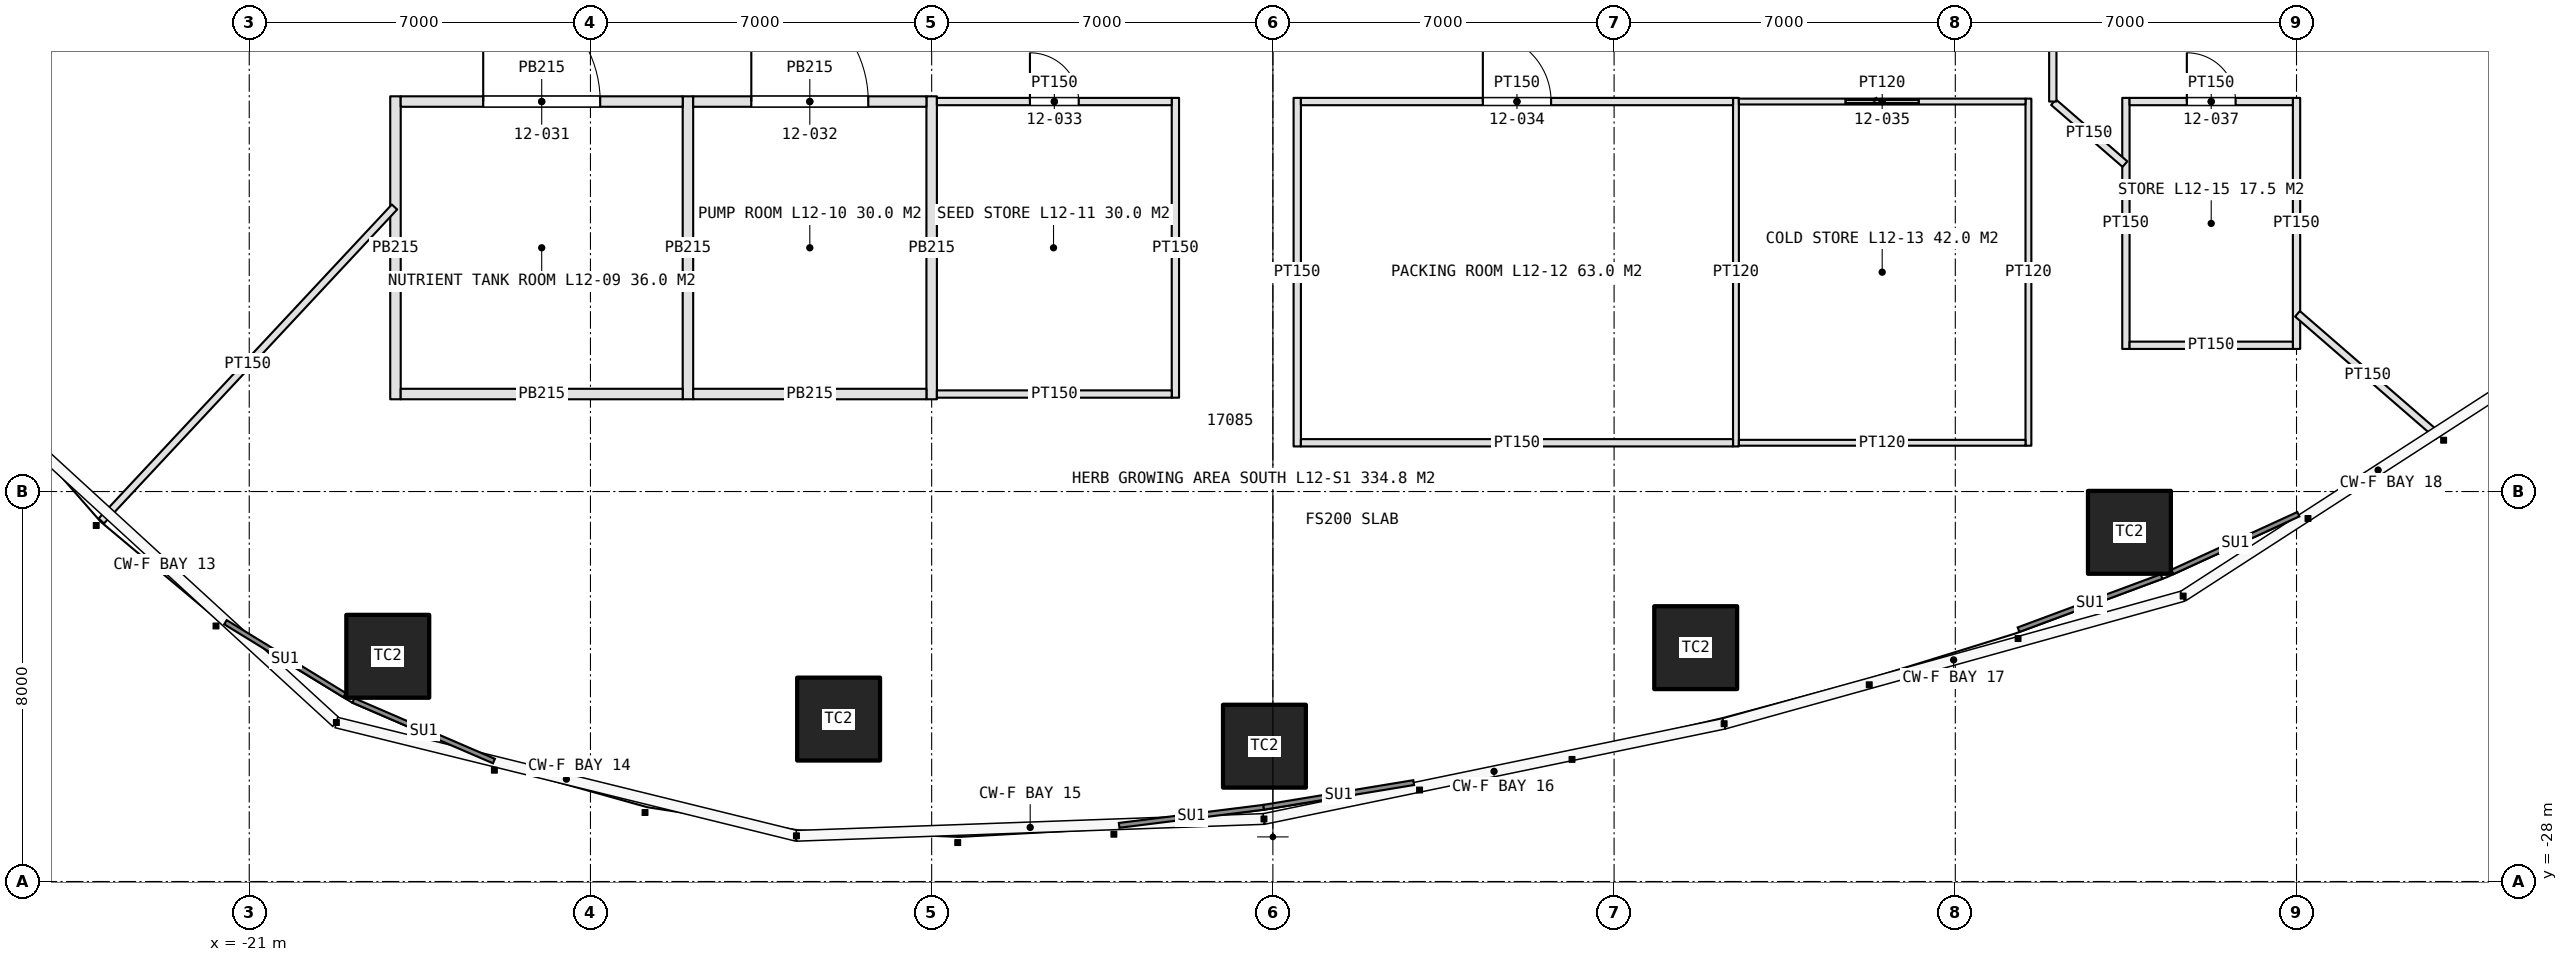
"""IFC4 building model, lengths in metres.
Left out: names, types, materials, properties, quantities, classifications, styles, units other than length and angle.
Written with IfcOpenShell. Run it as: python <this file> out.ifc"""

import sys

from ifc_helpers import new_model, si_unit, direction, frame, frame_2d, origin, origin_2d, place, context, subcontext, project, spatial, rectangle, extrude, element, fill, save


model = new_model("IFC4")
c1 = context("Model", 3, precision=1e-05, world=origin(), true_north=direction((0.0, 1.0)))
c2 = subcontext(c1, "Body", "Model", "MODEL_VIEW")
j1 = project(units=[si_unit("LENGTHUNIT", "METRE"), si_unit("PLANEANGLEUNIT", "RADIAN")], contexts=[c1])
p1 = place(None, origin())
s1 = spatial("IfcSite", under=j1, at=p1, CompositionType="ELEMENT")
p2 = place(p1, origin())
s2 = spatial("IfcBuilding", under=s1, at=p2, CompositionType="ELEMENT")
p3 = place(p2, frame((0.0, 0.0, 60.0)))
s3 = spatial("IfcBuildingStorey", under=s2, at=p3, CompositionType="ELEMENT", Elevation=60.0)
for number, where, z_axis, x_axis in (
    (1, (-18.158, -23.38, 0.0), (0.0, 0.0, 1.0), (1.0, 0.0, 0.0)),
    (2, (-8.909, -24.668, 0.0), (0.0, 0.0, 1.0), (1.0, 0.0, 0.0)),
    (3, (-0.173, -25.224, 0.0), (0.0, 0.0, 1.0), (1.0, 0.0, 0.0)),
    (4, (8.674, -23.203, 0.0), (0.0, 0.0, 1.0), (1.0, 0.0, 0.0)),
    (5, (17.572, -20.837, 0.0), (0.0, 0.0, 1.0), (1.0, 0.0, 0.0)),
):
    element("IfcColumn", number, at=place(p3, frame(where, z_axis=z_axis, x_axis=x_axis)), inside=s3, PredefinedType="COLUMN", context=c2, shape_type="SweptSolid", body=[
        extrude(rectangle(XDim=1.7, YDim=1.7, at=origin_2d()), origin(), (0.0, 0.0, 1.0), 5.0),
    ])
for number, where, z_axis, x_axis in (
    (6, (-18.0, -11.893, 0.0), (0.0, 0.0, 1.0), (0.0, -1.0, 0.0)),
    (7, (-12.0, -11.893, 0.0), (0.0, 0.0, 1.0), (0.0, -1.0, 0.0)),
    (8, (-7.0, -11.893, 0.0), (0.0, 0.0, 1.0), (0.0, -1.0, 0.0)),
):
    element("IfcWall", number, at=place(p3, frame(where, z_axis=z_axis, x_axis=x_axis)), inside=s3, PredefinedType="PARTITIONING", context=c2, shape_type="SweptSolid", body=[
        extrude(rectangle(XDim=6.215, YDim=0.215, at=frame_2d((3.107, 0.0))), origin(), (0.0, 0.0, 1.0), 3.6),
    ])
p4 = place(p3, frame((-2.0, -11.925, 0.0), z_axis=(0.0, 0.0, 1.0), x_axis=(0.0, -1.0, 0.0)))
e9 = element("IfcWall", 9, at=p4, inside=s3, PredefinedType="PARTITIONING", context=c2, shape_type="SweptSolid", body=[
    extrude(rectangle(XDim=6.15, YDim=0.15, at=frame_2d((3.075, 0.0))), origin(), (0.0, 0.0, 1.0), 3.6),
])
p5 = place(p3, frame((-17.893, -12.0, 0.0), z_axis=(0.0, 0.0, 1.0), x_axis=(1.0, 0.0, 0.0)))
e10 = element("IfcWall", 10, at=p5, inside=s3, PredefinedType="PARTITIONING", context=c2, shape_type="SweptSolid", body=[
    extrude(rectangle(XDim=5.785, YDim=0.215, at=frame_2d((2.893, 0.0))), origin(), (0.0, 0.0, 1.0), 3.6),
])
p6 = place(p5, frame((1.692, 0.0, 0.0)))
e11 = element("IfcOpeningElement", 11, at=p6, cuts=e10, PredefinedType="OPENING", context=c2, shape_type="SweptSolid", body=[
    extrude(rectangle(XDim=2.4, YDim=2.4, at=frame_2d((1.2, 1.2))), frame((0.0, 0.118, 0.0), z_axis=(0.0, -1.0, 0.0), x_axis=(1.0, 0.0, 0.0)), (0.0, 0.0, 1.0), 0.235),
])
p7 = place(p3, frame((-17.893, -18.0, 0.0), z_axis=(0.0, 0.0, 1.0), x_axis=(1.0, 0.0, 0.0)))
e12 = element("IfcWall", 12, at=p7, inside=s3, PredefinedType="PARTITIONING", context=c2, shape_type="SweptSolid", body=[
    extrude(rectangle(XDim=5.785, YDim=0.215, at=frame_2d((2.893, 0.0))), origin(), (0.0, 0.0, 1.0), 3.6),
])
p8 = place(p3, frame((-11.893, -12.0, 0.0), z_axis=(0.0, 0.0, 1.0), x_axis=(1.0, 0.0, 0.0)))
e13 = element("IfcWall", 13, at=p8, inside=s3, PredefinedType="PARTITIONING", context=c2, shape_type="SweptSolid", body=[
    extrude(rectangle(XDim=4.785, YDim=0.215, at=frame_2d((2.393, 0.0))), origin(), (0.0, 0.0, 1.0), 3.6),
])
p9 = place(p8, frame((1.192, 0.0, 0.0)))
e14 = element("IfcOpeningElement", 14, at=p9, cuts=e13, PredefinedType="OPENING", context=c2, shape_type="SweptSolid", body=[
    extrude(rectangle(XDim=2.4, YDim=2.4, at=frame_2d((1.2, 1.2))), frame((0.0, 0.118, 0.0), z_axis=(0.0, -1.0, 0.0), x_axis=(1.0, 0.0, 0.0)), (0.0, 0.0, 1.0), 0.235),
])
p10 = place(p3, frame((-11.893, -18.0, 0.0), z_axis=(0.0, 0.0, 1.0), x_axis=(1.0, 0.0, 0.0)))
e15 = element("IfcWall", 15, at=p10, inside=s3, PredefinedType="PARTITIONING", context=c2, shape_type="SweptSolid", body=[
    extrude(rectangle(XDim=4.785, YDim=0.215, at=frame_2d((2.393, 0.0))), origin(), (0.0, 0.0, 1.0), 3.6),
])
p11 = place(p3, frame((-6.893, -12.0, 0.0), z_axis=(0.0, 0.0, 1.0), x_axis=(1.0, 0.0, 0.0)))
e16 = element("IfcWall", 16, at=p11, inside=s3, PredefinedType="PARTITIONING", context=c2, shape_type="SweptSolid", body=[
    extrude(rectangle(XDim=4.818, YDim=0.15, at=frame_2d((2.409, 0.0))), origin(), (0.0, 0.0, 1.0), 3.6),
])
p12 = place(p11, frame((1.909, 0.0, 0.0)))
e17 = element("IfcOpeningElement", 17, at=p12, cuts=e16, PredefinedType="OPENING", context=c2, shape_type="SweptSolid", body=[
    extrude(rectangle(XDim=1.0, YDim=2.2, at=frame_2d((0.5, 1.1))), frame((0.0, 0.085, 0.0), z_axis=(0.0, -1.0, 0.0), x_axis=(1.0, 0.0, 0.0)), (0.0, 0.0, 1.0), 0.17),
])
p13 = place(p3, frame((-6.893, -18.0, 0.0), z_axis=(0.0, 0.0, 1.0), x_axis=(1.0, 0.0, 0.0)))
e18 = element("IfcWall", 18, at=p13, inside=s3, PredefinedType="PARTITIONING", context=c2, shape_type="SweptSolid", body=[
    extrude(rectangle(XDim=4.818, YDim=0.15, at=frame_2d((2.409, 0.0))), origin(), (0.0, 0.0, 1.0), 3.6),
])
p14 = place(p3, frame((0.5, -11.925, 0.0), z_axis=(0.0, 0.0, 1.0), x_axis=(0.0, -1.0, 0.0)))
e19 = element("IfcWall", 19, at=p14, inside=s3, PredefinedType="PARTITIONING", context=c2, shape_type="SweptSolid", body=[
    extrude(rectangle(XDim=7.15, YDim=0.15, at=frame_2d((3.575, 0.0))), origin(), (0.0, 0.0, 1.0), 3.6),
])
p15 = place(p3, frame((9.5, -11.925, 0.0), z_axis=(0.0, 0.0, 1.0), x_axis=(0.0, -1.0, 0.0)))
e20 = element("IfcWall", 20, at=p15, inside=s3, PredefinedType="PARTITIONING", context=c2, shape_type="SweptSolid", body=[
    extrude(rectangle(XDim=7.15, YDim=0.12, at=frame_2d((3.575, 0.0))), origin(), (0.0, 0.0, 1.0), 3.6),
])
p16 = place(p3, frame((15.5, -11.94, 0.0), z_axis=(0.0, 0.0, 1.0), x_axis=(0.0, -1.0, 0.0)))
e21 = element("IfcWall", 21, at=p16, inside=s3, PredefinedType="PARTITIONING", context=c2, shape_type="SweptSolid", body=[
    extrude(rectangle(XDim=7.12, YDim=0.12, at=frame_2d((3.56, 0.0))), origin(), (0.0, 0.0, 1.0), 3.6),
])
p17 = place(p3, frame((0.575, -12.0, 0.0), z_axis=(0.0, 0.0, 1.0), x_axis=(1.0, 0.0, 0.0)))
e22 = element("IfcWall", 22, at=p17, inside=s3, PredefinedType="PARTITIONING", context=c2, shape_type="SweptSolid", body=[
    extrude(rectangle(XDim=8.865, YDim=0.15, at=frame_2d((4.433, 0.0))), origin(), (0.0, 0.0, 1.0), 3.6),
])
p18 = place(p17, frame((3.732, 0.0, 0.0)))
e23 = element("IfcOpeningElement", 23, at=p18, cuts=e22, PredefinedType="OPENING", context=c2, shape_type="SweptSolid", body=[
    extrude(rectangle(XDim=1.4, YDim=2.4, at=frame_2d((0.7, 1.2))), frame((0.0, 0.085, 0.0), z_axis=(0.0, -1.0, 0.0), x_axis=(1.0, 0.0, 0.0)), (0.0, 0.0, 1.0), 0.17),
])
p19 = place(p3, frame((0.575, -19.0, 0.0), z_axis=(0.0, 0.0, 1.0), x_axis=(1.0, 0.0, 0.0)))
e24 = element("IfcWall", 24, at=p19, inside=s3, PredefinedType="PARTITIONING", context=c2, shape_type="SweptSolid", body=[
    extrude(rectangle(XDim=8.865, YDim=0.15, at=frame_2d((4.433, 0.0))), origin(), (0.0, 0.0, 1.0), 3.6),
])
p20 = place(p3, frame((9.56, -12.0, 0.0), z_axis=(0.0, 0.0, 1.0), x_axis=(1.0, 0.0, 0.0)))
e25 = element("IfcWall", 25, at=p20, inside=s3, PredefinedType="PARTITIONING", context=c2, shape_type="SweptSolid", body=[
    extrude(rectangle(XDim=5.88, YDim=0.12, at=frame_2d((2.94, 0.0))), origin(), (0.0, 0.0, 1.0), 3.6),
])
p21 = place(p20, frame((2.19, 0.0, 0.0)))
e26 = element("IfcOpeningElement", 26, at=p21, cuts=e25, PredefinedType="OPENING", context=c2, shape_type="SweptSolid", body=[
    extrude(rectangle(XDim=1.5, YDim=2.5, at=frame_2d((0.75, 1.25))), frame((0.0, 0.07, 0.0), z_axis=(0.0, -1.0, 0.0), x_axis=(1.0, 0.0, 0.0)), (0.0, 0.0, 1.0), 0.14),
])
p22 = place(p3, frame((9.56, -19.0, 0.0), z_axis=(0.0, 0.0, 1.0), x_axis=(1.0, 0.0, 0.0)))
e27 = element("IfcWall", 27, at=p22, inside=s3, PredefinedType="PARTITIONING", context=c2, shape_type="SweptSolid", body=[
    extrude(rectangle(XDim=5.88, YDim=0.12, at=frame_2d((2.94, 0.0))), origin(), (0.0, 0.0, 1.0), 3.6),
])
for number, where, z_axis, x_axis in (
    (28, (17.5, -11.925, 0.0), (0.0, 0.0, 1.0), (0.0, -1.0, 0.0)),
    (29, (21.0, -11.925, 0.0), (0.0, 0.0, 1.0), (0.0, -1.0, 0.0)),
):
    element("IfcWall", number, at=place(p3, frame(where, z_axis=z_axis, x_axis=x_axis)), inside=s3, PredefinedType="PARTITIONING", context=c2, shape_type="SweptSolid", body=[
        extrude(rectangle(XDim=5.15, YDim=0.15, at=frame_2d((2.575, 0.0))), origin(), (0.0, 0.0, 1.0), 3.6),
    ])
p23 = place(p3, frame((17.575, -12.0, 0.0), z_axis=(0.0, 0.0, 1.0), x_axis=(1.0, 0.0, 0.0)))
e30 = element("IfcWall", 30, at=p23, inside=s3, PredefinedType="PARTITIONING", context=c2, shape_type="SweptSolid", body=[
    extrude(rectangle(XDim=3.35, YDim=0.15, at=frame_2d((1.675, 0.0))), origin(), (0.0, 0.0, 1.0), 3.6),
])
p24 = place(p23, frame((1.175, 0.0, 0.0)))
e31 = element("IfcOpeningElement", 31, at=p24, cuts=e30, PredefinedType="OPENING", context=c2, shape_type="SweptSolid", body=[
    extrude(rectangle(XDim=1.0, YDim=2.2, at=frame_2d((0.5, 1.1))), frame((0.0, 0.085, 0.0), z_axis=(0.0, -1.0, 0.0), x_axis=(1.0, 0.0, 0.0)), (0.0, 0.0, 1.0), 0.17),
])
p25 = place(p3, frame((17.575, -17.0, 0.0), z_axis=(0.0, 0.0, 1.0), x_axis=(1.0, 0.0, 0.0)))
e32 = element("IfcWall", 32, at=p25, inside=s3, PredefinedType="PARTITIONING", context=c2, shape_type="SweptSolid", body=[
    extrude(rectangle(XDim=3.35, YDim=0.15, at=frame_2d((1.675, 0.0))), origin(), (0.0, 0.0, 1.0), 3.6),
])
p26 = place(p3, frame((-18.02, -14.163, 0.0), z_axis=(0.0, 0.0, 1.0), x_axis=(-0.682521563847, -0.730865456075, 0.0)))
e33 = element("IfcWall", 33, at=p26, inside=s3, PredefinedType="PARTITIONING", context=c2, shape_type="SweptSolid", body=[
    extrude(rectangle(XDim=8.812, YDim=0.15, at=frame_2d((4.406, 0.0))), origin(), (0.0, 0.0, 1.0), 3.6),
])
p27 = place(p3, frame((21.02, -16.354, 0.0), z_axis=(0.0, 0.0, 1.0), x_axis=(0.755425653008, -0.655234372402, 0.0)))
e34 = element("IfcWall", 34, at=p27, inside=s3, PredefinedType="PARTITIONING", context=c2, shape_type="SweptSolid", body=[
    extrude(rectangle(XDim=3.823, YDim=0.15, at=frame_2d((1.912, 0.0))), origin(), (0.0, 0.0, 1.0), 3.6),
])
p28 = place(p3, frame((16.015, -12.013, 0.0), z_axis=(0.0, 0.0, 1.0), x_axis=(0.755439771284, -0.65521809496, 0.0)))
e35 = element("IfcWall", 35, at=p28, inside=s3, PredefinedType="PARTITIONING", context=c2, shape_type="SweptSolid", body=[
    extrude(rectangle(XDim=1.939, YDim=0.15, at=frame_2d((0.969, 0.0))), origin(), (0.0, 0.0, 1.0), 3.6),
])
p29 = place(p3, frame((16.0, -12.0, 0.0), z_axis=(0.0, 0.0, 1.0), x_axis=(0.0, 1.0, 0.0)))
e36 = element("IfcWall", 36, at=p29, inside=s3, PredefinedType="PARTITIONING", context=c2, shape_type="SweptSolid", body=[
    extrude(rectangle(XDim=2.5, YDim=0.15, at=frame_2d((1.25, 0.0))), origin(), (0.0, 0.0, 1.0), 3.6),
])
p30 = place(p6, origin())
e37 = element("IfcDoor", 37, at=p30, inside=s3, OperationType="DOUBLE_DOOR_SINGLE_SWING", PredefinedType="DOOR", context=c2, shape_type="SweptSolid", body=[
    extrude(rectangle(XDim=2.4, YDim=2.4, at=frame_2d((1.2, 1.2))), frame((0.0, 0.025, 0.0), z_axis=(0.0, -1.0, 0.0), x_axis=(1.0, 0.0, 0.0)), (0.0, 0.0, 1.0), 0.05),
])
fill(e11, e37)
p31 = place(p9, origin())
e38 = element("IfcDoor", 38, at=p31, inside=s3, OperationType="DOUBLE_DOOR_SINGLE_SWING", PredefinedType="DOOR", context=c2, shape_type="SweptSolid", body=[
    extrude(rectangle(XDim=2.4, YDim=2.4, at=frame_2d((1.2, 1.2))), frame((0.0, 0.025, 0.0), z_axis=(0.0, -1.0, 0.0), x_axis=(1.0, 0.0, 0.0)), (0.0, 0.0, 1.0), 0.05),
])
fill(e14, e38)
p32 = place(p12, origin())
e39 = element("IfcDoor", 39, at=p32, inside=s3, OperationType="SINGLE_SWING_LEFT", PredefinedType="DOOR", context=c2, shape_type="SweptSolid", body=[
    extrude(rectangle(XDim=1.0, YDim=2.2, at=frame_2d((0.5, 1.1))), frame((0.0, 0.025, 0.0), z_axis=(0.0, -1.0, 0.0), x_axis=(1.0, 0.0, 0.0)), (0.0, 0.0, 1.0), 0.05),
])
fill(e17, e39)
p33 = place(p18, origin())
e40 = element("IfcDoor", 40, at=p33, inside=s3, OperationType="DOUBLE_DOOR_DOUBLE_SWING", PredefinedType="DOOR", context=c2, shape_type="SweptSolid", body=[
    extrude(rectangle(XDim=1.4, YDim=2.4, at=frame_2d((0.7, 1.2))), frame((0.0, 0.025, 0.0), z_axis=(0.0, -1.0, 0.0), x_axis=(1.0, 0.0, 0.0)), (0.0, 0.0, 1.0), 0.05),
])
fill(e23, e40)
p34 = place(p21, origin())
e41 = element("IfcDoor", 41, at=p34, inside=s3, OperationType="SLIDING_TO_LEFT", PredefinedType="DOOR", context=c2, shape_type="SweptSolid", body=[
    extrude(rectangle(XDim=1.5, YDim=2.5, at=frame_2d((0.75, 1.25))), frame((0.0, 0.025, 0.0), z_axis=(0.0, -1.0, 0.0), x_axis=(1.0, 0.0, 0.0)), (0.0, 0.0, 1.0), 0.05),
])
fill(e26, e41)
p35 = place(p24, origin())
e42 = element("IfcDoor", 42, at=p35, inside=s3, OperationType="SINGLE_SWING_LEFT", PredefinedType="DOOR", context=c2, shape_type="SweptSolid", body=[
    extrude(rectangle(XDim=1.0, YDim=2.2, at=frame_2d((0.5, 1.1))), frame((0.0, 0.025, 0.0), z_axis=(0.0, -1.0, 0.0), x_axis=(1.0, 0.0, 0.0)), (0.0, 0.0, 1.0), 0.05),
])
fill(e31, e42)
save(model, sys.argv[1])
